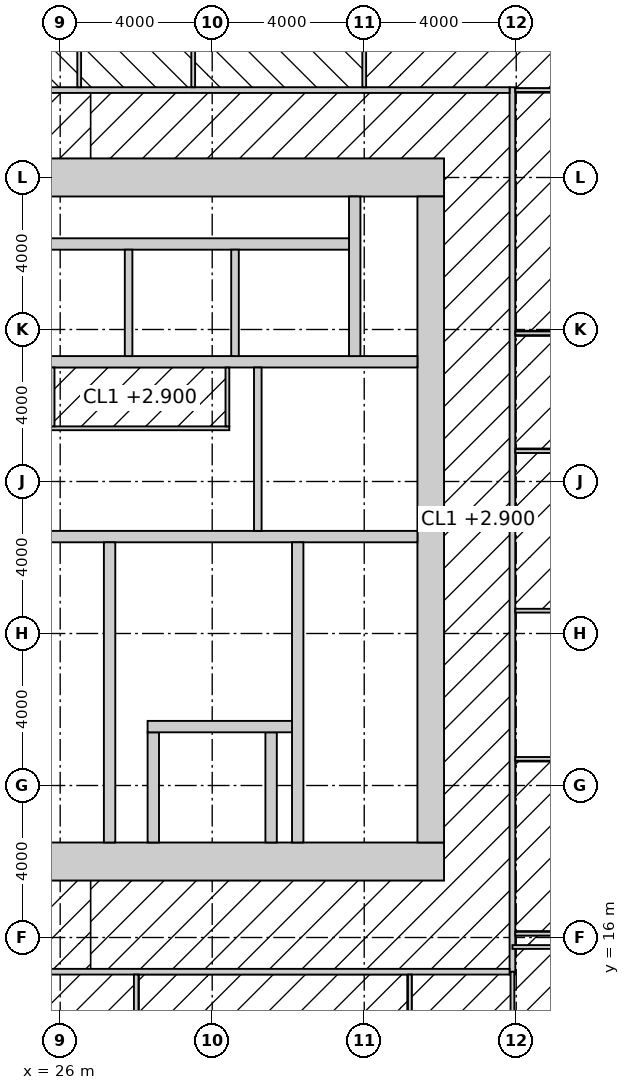
"""IFC4 building model, lengths in metres.
Left out: names, types, materials, properties, quantities, classifications, styles, units other than length and angle.
Written with IfcOpenShell. Run it as: python <this file> out.ifc"""

import sys

from ifc_helpers import new_model, si_unit, direction, frame, frame_2d, origin, place, context, subcontext, project, spatial, rectangle, extrude, element, fill, save


model = new_model("IFC4")
c1 = context("Model", 3, precision=1e-05, world=origin(), true_north=direction((0.0, 1.0)))
c2 = subcontext(c1, "Body", "Model", "MODEL_VIEW")
j1 = project(units=[si_unit("LENGTHUNIT", "METRE"), si_unit("PLANEANGLEUNIT", "RADIAN")], contexts=[c1])
p1 = place(None, origin())
s1 = spatial("IfcSite", under=j1, at=p1, CompositionType="ELEMENT")
p2 = place(p1, origin())
s2 = spatial("IfcBuilding", under=s1, at=p2, CompositionType="ELEMENT")
p3 = place(p2, frame((0.0, 0.0, 81.4)))
s3 = spatial("IfcBuildingStorey", under=s2, at=p3, CompositionType="ELEMENT", Elevation=81.4)
p4 = place(p3, frame((18.5, 18.0, -0.15), z_axis=(0.0, 0.0, 1.0), x_axis=(1.0, 0.0, 0.0)))
e1 = element("IfcWall", 1, at=p4, inside=s3, PredefinedType="SHEAR", context=c2, shape_type="SweptSolid", body=[
    extrude(rectangle(XDim=17.6, YDim=1.0, at=frame_2d((8.8, 0.0))), origin(), (0.0, 0.0, 1.0), 4.0),
])
p5 = place(p4, frame((3.45, 0.0, 0.15)))
e2 = element("IfcOpeningElement", 2, at=p5, cuts=e1, PredefinedType="OPENING", context=c2, shape_type="SweptSolid", body=[
    extrude(rectangle(XDim=1.5, YDim=2.4, at=frame_2d((0.75, 1.2))), frame((0.0, 0.51, 0.0), z_axis=(0.0, -1.0, 0.0), x_axis=(1.0, 0.0, 0.0)), (0.0, 0.0, 1.0), 1.02),
])
p6 = place(p3, frame((18.5, 36.0, -0.15), z_axis=(0.0, 0.0, 1.0), x_axis=(1.0, 0.0, 0.0)))
e3 = element("IfcWall", 3, at=p6, inside=s3, PredefinedType="SHEAR", context=c2, shape_type="SweptSolid", body=[
    extrude(rectangle(XDim=17.6, YDim=1.0, at=frame_2d((8.8, 0.0))), origin(), (0.0, 0.0, 1.0), 4.0),
])
p7 = place(p3, frame((35.75, 18.5, -0.15), z_axis=(0.0, 0.0, 1.0), x_axis=(0.0, 1.0, 0.0)))
e4 = element("IfcWall", 4, at=p7, inside=s3, PredefinedType="SHEAR", context=c2, shape_type="SweptSolid", body=[
    extrude(rectangle(XDim=17.0, YDim=0.7, at=frame_2d((8.5, 0.0))), origin(), (0.0, 0.0, 1.0), 4.0),
])
p8 = place(p7, frame((9.85, 0.0, 0.15)))
e5 = element("IfcOpeningElement", 5, at=p8, cuts=e4, PredefinedType="OPENING", context=c2, shape_type="SweptSolid", body=[
    extrude(rectangle(XDim=1.0, YDim=2.2, at=frame_2d((0.5, 1.1))), frame((0.0, 0.36, 0.0), z_axis=(0.0, -1.0, 0.0), x_axis=(1.0, 0.0, 0.0)), (0.0, 0.0, 1.0), 0.72),
])
p9 = place(p3, frame((24.15, 26.55, -0.15), z_axis=(0.0, 0.0, 1.0), x_axis=(1.0, 0.0, 0.0)))
e6 = element("IfcWall", 6, at=p9, inside=s3, PredefinedType="SHEAR", context=c2, shape_type="SweptSolid", body=[
    extrude(rectangle(XDim=11.25, YDim=0.3, at=frame_2d((5.625, 0.0))), origin(), (0.0, 0.0, 1.0), 4.0),
])
p10 = place(p9, frame((9.25, 0.0, 0.15)))
e7 = element("IfcOpeningElement", 7, at=p10, cuts=e6, PredefinedType="OPENING", context=c2, shape_type="SweptSolid", body=[
    extrude(rectangle(XDim=1.0, YDim=2.2, at=frame_2d((0.5, 1.1))), frame((0.0, 0.16, 0.0), z_axis=(0.0, -1.0, 0.0), x_axis=(1.0, 0.0, 0.0)), (0.0, 0.0, 1.0), 0.32),
])
p11 = place(p9, frame((4.9, 0.0, 0.15)))
e8 = element("IfcOpeningElement", 8, at=p11, cuts=e6, PredefinedType="OPENING", context=c2, shape_type="SweptSolid", body=[
    extrude(rectangle(XDim=1.5, YDim=2.4, at=frame_2d((0.75, 1.2))), frame((0.0, 0.16, 0.0), z_axis=(0.0, -1.0, 0.0), x_axis=(1.0, 0.0, 0.0)), (0.0, 0.0, 1.0), 0.32),
])
p12 = place(p3, frame((27.3, 18.5, -0.15), z_axis=(0.0, 0.0, 1.0), x_axis=(0.0, 1.0, 0.0)))
e9 = element("IfcWall", 9, at=p12, inside=s3, PredefinedType="SHEAR", context=c2, shape_type="SweptSolid", body=[
    extrude(rectangle(XDim=7.9, YDim=0.3, at=frame_2d((3.95, 0.0))), origin(), (0.0, 0.0, 1.0), 4.0),
])
p13 = place(p12, frame((6.4, 0.0, 0.15)))
e10 = element("IfcOpeningElement", 10, at=p13, cuts=e9, PredefinedType="OPENING", context=c2, shape_type="SweptSolid", body=[
    extrude(rectangle(XDim=1.0, YDim=2.2, at=frame_2d((0.5, 1.1))), frame((0.0, 0.16, 0.0), z_axis=(0.0, -1.0, 0.0), x_axis=(1.0, 0.0, 0.0)), (0.0, 0.0, 1.0), 0.32),
])
p14 = place(p3, frame((32.25, 18.5, -0.15), z_axis=(0.0, 0.0, 1.0), x_axis=(0.0, 1.0, 0.0)))
e11 = element("IfcWall", 11, at=p14, inside=s3, PredefinedType="SHEAR", context=c2, shape_type="SweptSolid", body=[
    extrude(rectangle(XDim=7.9, YDim=0.3, at=frame_2d((3.95, 0.0))), origin(), (0.0, 0.0, 1.0), 4.0),
])
for number, where, z_axis, x_axis in (
    (12, (28.45, 18.5, -0.15), (0.0, 0.0, 1.0), (0.0, 1.0, 0.0)),
    (13, (31.55, 18.5, -0.15), (0.0, 0.0, 1.0), (0.0, 1.0, 0.0)),
):
    element("IfcWall", number, at=place(p3, frame(where, z_axis=z_axis, x_axis=x_axis)), inside=s3, PredefinedType="SHEAR", context=c2, shape_type="SweptSolid", body=[
        extrude(rectangle(XDim=2.9, YDim=0.3, at=frame_2d((1.45, 0.0))), origin(), (0.0, 0.0, 1.0), 4.0),
    ])
p15 = place(p3, frame((28.3, 21.55, -0.15), z_axis=(0.0, 0.0, 1.0), x_axis=(1.0, 0.0, 0.0)))
e14 = element("IfcWall", 14, at=p15, inside=s3, PredefinedType="SHEAR", context=c2, shape_type="SweptSolid", body=[
    extrude(rectangle(XDim=3.8, YDim=0.3, at=frame_2d((1.9, 0.0))), origin(), (0.0, 0.0, 1.0), 4.0),
])
p16 = place(p15, frame((1.05, 0.0, 0.15)))
e15 = element("IfcOpeningElement", 15, at=p16, cuts=e14, PredefinedType="OPENING", context=c2, shape_type="SweptSolid", body=[
    extrude(rectangle(XDim=1.3, YDim=2.4, at=frame_2d((0.65, 1.2))), frame((0.0, 0.16, 0.0), z_axis=(0.0, -1.0, 0.0), x_axis=(1.0, 0.0, 0.0)), (0.0, 0.0, 1.0), 0.32),
])
p17 = place(p3, frame((24.15, 31.15, -0.15), z_axis=(0.0, 0.0, 1.0), x_axis=(1.0, 0.0, 0.0)))
e16 = element("IfcWall", 16, at=p17, inside=s3, PredefinedType="SHEAR", context=c2, shape_type="SweptSolid", body=[
    extrude(rectangle(XDim=11.25, YDim=0.3, at=frame_2d((5.625, 0.0))), origin(), (0.0, 0.0, 1.0), 4.0),
])
p18 = place(p17, frame((7.25, 0.0, 0.15)))
e17 = element("IfcOpeningElement", 17, at=p18, cuts=e16, PredefinedType="OPENING", context=c2, shape_type="SweptSolid", body=[
    extrude(rectangle(XDim=1.4, YDim=2.4, at=frame_2d((0.7, 1.2))), frame((0.0, 0.16, 0.0), z_axis=(0.0, -1.0, 0.0), x_axis=(1.0, 0.0, 0.0)), (0.0, 0.0, 1.0), 0.32),
])
p19 = place(p3, frame((33.75, 31.3, -0.15), z_axis=(0.0, 0.0, 1.0), x_axis=(0.0, 1.0, 0.0)))
e18 = element("IfcWall", 18, at=p19, inside=s3, PredefinedType="SHEAR", context=c2, shape_type="SweptSolid", body=[
    extrude(rectangle(XDim=4.2, YDim=0.3, at=frame_2d((2.1, 0.0))), origin(), (0.0, 0.0, 1.0), 4.0),
])
p20 = place(p3, frame((25.0, 34.25, -0.15), z_axis=(0.0, 0.0, 1.0), x_axis=(1.0, 0.0, 0.0)))
e19 = element("IfcWall", 19, at=p20, inside=s3, PredefinedType="SHEAR", context=c2, shape_type="SweptSolid", body=[
    extrude(rectangle(XDim=8.6, YDim=0.3, at=frame_2d((4.3, 0.0))), origin(), (0.0, 0.0, 1.0), 4.0),
])
for number, where, z_axis, x_axis in (
    (20, (27.8, 31.3, -0.15), (0.0, 0.0, 1.0), (0.0, 1.0, 0.0)),
    (21, (30.6, 31.3, -0.15), (0.0, 0.0, 1.0), (0.0, 1.0, 0.0)),
):
    element("IfcWall", number, at=place(p3, frame(where, z_axis=z_axis, x_axis=x_axis)), inside=s3, PredefinedType="SOLIDWALL", context=c2, shape_type="SweptSolid", body=[
        extrude(rectangle(XDim=2.8, YDim=0.2, at=frame_2d((1.4, 0.0))), origin(), (0.0, 0.0, 1.0), 4.0),
    ])
p21 = place(p3, frame((31.2, 26.7, 0.0), z_axis=(0.0, 0.0, 1.0), x_axis=(0.0, 1.0, 0.0)))
e22 = element("IfcWall", 22, at=p21, inside=s3, PredefinedType="SOLIDWALL", context=c2, shape_type="SweptSolid", body=[
    extrude(rectangle(XDim=4.3, YDim=0.2, at=frame_2d((2.15, 0.0))), origin(), (0.0, 0.0, 1.0), 3.85),
])
p22 = place(p3, frame((25.75, 29.4, 0.0), z_axis=(0.0, 0.0, 1.0), x_axis=(1.0, 0.0, 0.0)))
e23 = element("IfcWall", 23, at=p22, inside=s3, PredefinedType="PARTITIONING", context=c2, shape_type="SweptSolid", body=[
    extrude(rectangle(XDim=4.7, YDim=0.1, at=frame_2d((2.35, 0.0))), origin(), (0.0, 0.0, 1.0), 3.85),
])
p23 = place(p22, frame((1.85, 0.0, 0.0)))
e24 = element("IfcOpeningElement", 24, at=p23, cuts=e23, PredefinedType="OPENING", context=c2, shape_type="SweptSolid", body=[
    extrude(rectangle(XDim=1.0, YDim=2.2, at=frame_2d((0.5, 1.1))), frame((0.0, 0.06, 0.0), z_axis=(0.0, -1.0, 0.0), x_axis=(1.0, 0.0, 0.0)), (0.0, 0.0, 1.0), 0.12),
])
for number, where, z_axis, x_axis in (
    (25, (25.8, 29.45, 0.0), (0.0, 0.0, 1.0), (0.0, 1.0, 0.0)),
    (26, (30.4, 29.45, 0.0), (0.0, 0.0, 1.0), (0.0, 1.0, 0.0)),
):
    element("IfcWall", number, at=place(p3, frame(where, z_axis=z_axis, x_axis=x_axis)), inside=s3, PredefinedType="PARTITIONING", context=c2, shape_type="SweptSolid", body=[
        extrude(rectangle(XDim=1.55, YDim=0.1, at=frame_2d((0.775, 0.0))), origin(), (0.0, 0.0, 1.0), 3.85),
    ])
p24 = place(p3, frame((37.9, 15.025, 0.0), z_axis=(0.0, 0.0, 1.0), x_axis=(0.0, 1.0, 0.0)))
e27 = element("IfcWall", 27, at=p24, inside=s3, PredefinedType="PARTITIONING", context=c2, shape_type="SweptSolid", body=[
    extrude(rectangle(XDim=23.35, YDim=0.15, at=frame_2d((11.675, 0.0))), origin(), (0.0, 0.0, 1.0), 2.95),
])
p25 = place(p24, frame((10.775, 0.0, 0.0)))
e28 = element("IfcOpeningElement", 28, at=p25, cuts=e27, PredefinedType="OPENING", context=c2, shape_type="SweptSolid", body=[
    extrude(rectangle(XDim=1.8, YDim=2.4, at=frame_2d((0.9, 1.2))), frame((0.0, 0.085, 0.0), z_axis=(0.0, -1.0, 0.0), x_axis=(1.0, 0.0, 0.0)), (0.0, 0.0, 1.0), 0.17),
])
p26 = place(p3, frame((15.775, 15.1, 0.0), z_axis=(0.0, 0.0, 1.0), x_axis=(1.0, 0.0, 0.0)))
e29 = element("IfcWall", 29, at=p26, inside=s3, PredefinedType="PARTITIONING", context=c2, shape_type="SweptSolid", body=[
    extrude(rectangle(XDim=22.05, YDim=0.15, at=frame_2d((11.025, 0.0))), origin(), (0.0, 0.0, 1.0), 3.85),
])
p27 = place(p3, frame((15.775, 38.3, 0.0), z_axis=(0.0, 0.0, 1.0), x_axis=(1.0, 0.0, 0.0)))
e30 = element("IfcWall", 30, at=p27, inside=s3, PredefinedType="PARTITIONING", context=c2, shape_type="SweptSolid", body=[
    extrude(rectangle(XDim=22.05, YDim=0.15, at=frame_2d((11.025, 0.0))), origin(), (0.0, 0.0, 1.0), 3.85),
])
p28 = place(p27, frame((7.975, 0.0, 0.0)))
e31 = element("IfcOpeningElement", 31, at=p28, cuts=e30, PredefinedType="OPENING", context=c2, shape_type="SweptSolid", body=[
    extrude(rectangle(XDim=0.9, YDim=2.1, at=frame_2d((0.45, 1.05))), frame((0.0, 0.085, 0.0), z_axis=(0.0, -1.0, 0.0), x_axis=(1.0, 0.0, 0.0)), (0.0, 0.0, 1.0), 0.17),
])
p29 = place(p27, frame((11.725, 0.0, 0.0)))
e32 = element("IfcOpeningElement", 32, at=p29, cuts=e30, PredefinedType="OPENING", context=c2, shape_type="SweptSolid", body=[
    extrude(rectangle(XDim=1.0, YDim=2.1, at=frame_2d((0.5, 1.05))), frame((0.0, 0.085, 0.0), z_axis=(0.0, -1.0, 0.0), x_axis=(1.0, 0.0, 0.0)), (0.0, 0.0, 1.0), 0.17),
])
p30 = place(p27, frame((15.575, 0.0, 0.0)))
e33 = element("IfcOpeningElement", 33, at=p30, cuts=e30, PredefinedType="OPENING", context=c2, shape_type="SweptSolid", body=[
    extrude(rectangle(XDim=0.9, YDim=2.1, at=frame_2d((0.45, 1.05))), frame((0.0, 0.085, 0.0), z_axis=(0.0, -1.0, 0.0), x_axis=(1.0, 0.0, 0.0)), (0.0, 0.0, 1.0), 0.17),
])
p31 = place(p3, frame((34.0, 38.375, 0.0), z_axis=(0.0, 0.0, 1.0), x_axis=(0.0, 1.0, 0.0)))
e34 = element("IfcWall", 34, at=p31, inside=s3, PredefinedType="PARTITIONING", context=c2, shape_type="SweptSolid", body=[
    extrude(rectangle(XDim=3.675, YDim=0.1, at=frame_2d((1.837, 0.0))), origin(), (0.0, 0.0, 1.0), 2.95),
])
for number, where, z_axis, x_axis in (
    (35, (26.5, 38.375, 0.0), (0.0, 0.0, 1.0), (0.0, 1.0, 0.0)),
    (36, (29.5, 38.375, 0.0), (0.0, 0.0, 1.0), (0.0, 1.0, 0.0)),
):
    element("IfcWall", number, at=place(p3, frame(where, z_axis=z_axis, x_axis=x_axis)), inside=s3, PredefinedType="PARTITIONING", context=c2, shape_type="SweptSolid", body=[
        extrude(rectangle(XDim=3.575, YDim=0.1, at=frame_2d((1.788, 0.0))), origin(), (0.0, 0.0, 1.0), 3.85),
    ])
p32 = place(p3, frame((28.0, 0.3, 0.0), z_axis=(0.0, 0.0, 1.0), x_axis=(0.0, 1.0, 0.0)))
e37 = element("IfcWall", 37, at=p32, inside=s3, PredefinedType="PARTITIONING", context=c2, shape_type="SweptSolid", body=[
    extrude(rectangle(XDim=14.725, YDim=0.12, at=frame_2d((7.362, 0.0))), origin(), (0.0, 0.0, 1.0), 3.85),
])
p33 = place(p3, frame((37.975, 16.1, 0.0), z_axis=(0.0, 0.0, 1.0), x_axis=(1.0, 0.0, 0.0)))
e38 = element("IfcWall", 38, at=p33, inside=s3, PredefinedType="PARTITIONING", context=c2, shape_type="SweptSolid", body=[
    extrude(rectangle(XDim=5.975, YDim=0.1, at=frame_2d((2.987, 0.0))), origin(), (0.0, 0.0, 1.0), 3.85),
])
p34 = place(p3, frame((37.975, 20.7, 0.0), z_axis=(0.0, 0.0, 1.0), x_axis=(1.0, 0.0, 0.0)))
e39 = element("IfcWall", 39, at=p34, inside=s3, PredefinedType="PARTITIONING", context=c2, shape_type="SweptSolid", body=[
    extrude(rectangle(XDim=5.875, YDim=0.1, at=frame_2d((2.938, 0.0))), origin(), (0.0, 0.0, 1.0), 3.85),
])
for number, where, z_axis, x_axis in (
    (40, (37.975, 24.6, 0.0), (0.0, 0.0, 1.0), (1.0, 0.0, 0.0)),
    (41, (37.975, 28.8, 0.0), (0.0, 0.0, 1.0), (1.0, 0.0, 0.0)),
):
    element("IfcWall", number, at=place(p3, frame(where, z_axis=z_axis, x_axis=x_axis)), inside=s3, PredefinedType="PARTITIONING", context=c2, shape_type="SweptSolid", body=[
        extrude(rectangle(XDim=5.975, YDim=0.1, at=frame_2d((2.987, 0.0))), origin(), (0.0, 0.0, 1.0), 3.85),
    ])
p35 = place(p3, frame((37.975, 31.9, 0.0), z_axis=(0.0, 0.0, 1.0), x_axis=(1.0, 0.0, 0.0)))
e42 = element("IfcWall", 42, at=p35, inside=s3, PredefinedType="PARTITIONING", context=c2, shape_type="SweptSolid", body=[
    extrude(rectangle(XDim=5.875, YDim=0.1, at=frame_2d((2.938, 0.0))), origin(), (0.0, 0.0, 1.0), 2.95),
])
p36 = place(p3, frame((37.975, 38.3, 0.0), z_axis=(0.0, 0.0, 1.0), x_axis=(1.0, 0.0, 0.0)))
e43 = element("IfcWall", 43, at=p36, inside=s3, PredefinedType="PARTITIONING", context=c2, shape_type="SweptSolid", body=[
    extrude(rectangle(XDim=5.975, YDim=0.1, at=frame_2d((2.987, 0.0))), origin(), (0.0, 0.0, 1.0), 3.85),
])
p37 = place(p3, frame((35.201, 10.35, 0.0), z_axis=(0.0, 0.0, 1.0), x_axis=(0.0, 1.0, 0.0)))
e44 = element("IfcWall", 44, at=p37, inside=s3, PredefinedType="PARTITIONING", context=c2, shape_type="SweptSolid", body=[
    extrude(rectangle(XDim=4.675, YDim=0.1, at=frame_2d((2.337, 0.0))), origin(), (0.0, 0.0, 1.0), 3.85),
])
p38 = place(p3, frame((37.9, 15.1, 0.0), z_axis=(0.0, 0.0, 1.0), x_axis=(0.0, -1.0, 0.0)))
e45 = element("IfcWall", 45, at=p38, inside=s3, PredefinedType="PARTITIONING", context=c2, shape_type="SweptSolid", body=[
    extrude(rectangle(XDim=4.45, YDim=0.1, at=frame_2d((2.225, 0.0))), origin(), (0.0, 0.0, 1.0), 2.95),
])
p39 = place(p3, frame((42.4, 15.75, 0.0), z_axis=(0.0, 0.0, 1.0), x_axis=(-1.0, 0.0, 0.0)))
e46 = element("IfcWall", 46, at=p39, inside=s3, PredefinedType="PARTITIONING", context=c2, shape_type="SweptSolid", body=[
    extrude(rectangle(XDim=4.5, YDim=0.1, at=frame_2d((2.25, 0.0))), origin(), (0.0, 0.0, 1.0), 3.85),
])
p40 = place(p13, origin())
e47 = element("IfcDoor", 47, at=p40, inside=s3, OperationType="SINGLE_SWING_RIGHT", PredefinedType="DOOR", context=c2, shape_type="SweptSolid", body=[
    extrude(rectangle(XDim=1.0, YDim=2.2, at=frame_2d((0.5, 1.1))), frame((0.0, 0.025, 0.0), z_axis=(0.0, -1.0, 0.0), x_axis=(1.0, 0.0, 0.0)), (0.0, 0.0, 1.0), 0.05),
])
fill(e10, e47)
p41 = place(p10, frame((1.0, 0.0, 0.0), z_axis=(0.0, 0.0, 1.0), x_axis=(-1.0, 0.0, 0.0)))
e48 = element("IfcDoor", 48, at=p41, inside=s3, OperationType="SINGLE_SWING_RIGHT", PredefinedType="DOOR", context=c2, shape_type="SweptSolid", body=[
    extrude(rectangle(XDim=1.0, YDim=2.2, at=frame_2d((0.5, 1.1))), frame((0.0, 0.025, 0.0), z_axis=(0.0, -1.0, 0.0), x_axis=(1.0, 0.0, 0.0)), (0.0, 0.0, 1.0), 0.05),
])
fill(e7, e48)
p42 = place(p8, origin())
e49 = element("IfcDoor", 49, at=p42, inside=s3, OperationType="SINGLE_SWING_RIGHT", PredefinedType="DOOR", context=c2, shape_type="SweptSolid", body=[
    extrude(rectangle(XDim=1.0, YDim=2.2, at=frame_2d((0.5, 1.1))), frame((0.0, 0.025, 0.0), z_axis=(0.0, -1.0, 0.0), x_axis=(1.0, 0.0, 0.0)), (0.0, 0.0, 1.0), 0.05),
])
fill(e5, e49)
p43 = place(p11, origin())
e50 = element("IfcDoor", 50, at=p43, inside=s3, OperationType="DOUBLE_DOOR_DOUBLE_SWING", PredefinedType="DOOR", context=c2, shape_type="SweptSolid", body=[
    extrude(rectangle(XDim=1.5, YDim=2.4, at=frame_2d((0.75, 1.2))), frame((0.0, 0.025, 0.0), z_axis=(0.0, -1.0, 0.0), x_axis=(1.0, 0.0, 0.0)), (0.0, 0.0, 1.0), 0.05),
])
fill(e8, e50)
p44 = place(p23, origin())
e51 = element("IfcDoor", 51, at=p44, inside=s3, OperationType="SINGLE_SWING_LEFT", PredefinedType="DOOR", context=c2, shape_type="SweptSolid", body=[
    extrude(rectangle(XDim=1.0, YDim=2.2, at=frame_2d((0.5, 1.1))), frame((0.0, 0.025, 0.0), z_axis=(0.0, -1.0, 0.0), x_axis=(1.0, 0.0, 0.0)), (0.0, 0.0, 1.0), 0.05),
])
fill(e24, e51)
p45 = place(p29, origin())
e52 = element("IfcDoor", 52, at=p45, inside=s3, OperationType="SLIDING_TO_LEFT", PredefinedType="DOOR", context=c2, shape_type="SweptSolid", body=[
    extrude(rectangle(XDim=1.0, YDim=2.1, at=frame_2d((0.5, 1.05))), frame((0.0, 0.025, 0.0), z_axis=(0.0, -1.0, 0.0), x_axis=(1.0, 0.0, 0.0)), (0.0, 0.0, 1.0), 0.05),
])
fill(e32, e52)
p46 = place(p30, origin())
e53 = element("IfcDoor", 53, at=p46, inside=s3, OperationType="SINGLE_SWING_LEFT", PredefinedType="DOOR", context=c2, shape_type="SweptSolid", body=[
    extrude(rectangle(XDim=0.9, YDim=2.1, at=frame_2d((0.45, 1.05))), frame((0.0, 0.025, 0.0), z_axis=(0.0, -1.0, 0.0), x_axis=(1.0, 0.0, 0.0)), (0.0, 0.0, 1.0), 0.05),
])
fill(e33, e53)
p47 = place(p25, origin())
e54 = element("IfcDoor", 54, at=p47, inside=s3, OperationType="DOUBLE_DOOR_DOUBLE_SWING", PredefinedType="DOOR", context=c2, shape_type="SweptSolid", body=[
    extrude(rectangle(XDim=1.8, YDim=2.4, at=frame_2d((0.9, 1.2))), frame((0.0, 0.025, 0.0), z_axis=(0.0, -1.0, 0.0), x_axis=(1.0, 0.0, 0.0)), (0.0, 0.0, 1.0), 0.05),
])
fill(e28, e54)
p48 = place(p16, origin())
e55 = element("IfcDoor", 55, at=p48, inside=s3, OperationType="DOUBLE_DOOR_SLIDING", PredefinedType="DOOR", context=c2, shape_type="SweptSolid", body=[
    extrude(rectangle(XDim=1.3, YDim=2.4, at=frame_2d((0.65, 1.2))), frame((0.0, 0.025, 0.0), z_axis=(0.0, -1.0, 0.0), x_axis=(1.0, 0.0, 0.0)), (0.0, 0.0, 1.0), 0.05),
])
fill(e15, e55)
p49 = place(p18, origin())
e56 = element("IfcDoor", 56, at=p49, inside=s3, OperationType="DOUBLE_DOOR_SLIDING", PredefinedType="DOOR", context=c2, shape_type="SweptSolid", body=[
    extrude(rectangle(XDim=1.4, YDim=2.4, at=frame_2d((0.7, 1.2))), frame((0.0, 0.025, 0.0), z_axis=(0.0, -1.0, 0.0), x_axis=(1.0, 0.0, 0.0)), (0.0, 0.0, 1.0), 0.05),
])
fill(e17, e56)
save(model, sys.argv[1])
